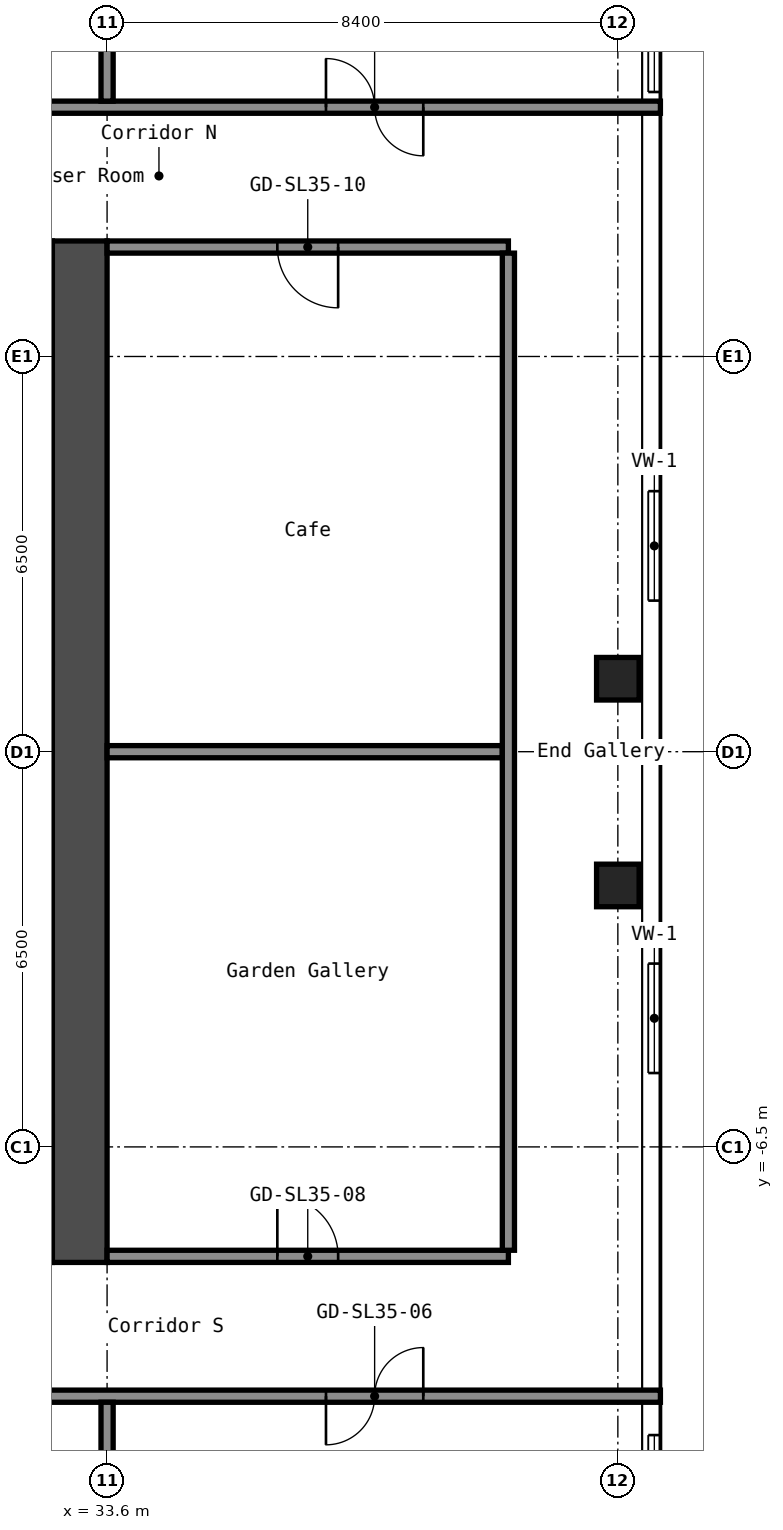
"""IFC4 building model, lengths in metres.
Left out: names, types, materials, properties, quantities, classifications, styles, units other than length and angle.
Written with IfcOpenShell. Run it as: python <this file> out.ifc"""

import sys

from ifc_helpers import new_model, si_unit, direction, frame, frame_2d, origin, origin_2d, place, context, subcontext, project, spatial, rectangle, hollow_rectangle, extrude, element, fill, save


model = new_model("IFC4")
c1 = context("Model", 3, precision=1e-05, world=origin(), true_north=direction((0.0, 1.0)))
c2 = subcontext(c1, "Body", "Model", "MODEL_VIEW")
j1 = project(units=[si_unit("LENGTHUNIT", "METRE"), si_unit("PLANEANGLEUNIT", "RADIAN")], contexts=[c1])
p1 = place(None, origin())
s1 = spatial("IfcSite", under=j1, at=p1, CompositionType="ELEMENT")
p2 = place(p1, origin())
s2 = spatial("IfcBuilding", under=s1, at=p2, CompositionType="ELEMENT")
p3 = place(p2, frame((0.0, 0.0, 124.6)))
s3 = spatial("IfcBuildingStorey", under=s2, at=p3, CompositionType="ELEMENT", Elevation=124.6)
for number, where, z_axis, x_axis in (
    (1, (42.0, -2.2, 0.0), (0.0, 0.0, 1.0), (1.0, 0.0, 0.0)),
    (2, (42.0, 1.2, 0.0), (0.0, 0.0, 1.0), (1.0, 0.0, 0.0)),
):
    element("IfcColumn", number, at=place(p3, frame(where, z_axis=z_axis, x_axis=x_axis)), inside=s3, PredefinedType="COLUMN", context=c2, shape_type="SweptSolid", body=[
        extrude(hollow_rectangle(XDim=0.7, YDim=0.7, WallThickness=0.028, at=origin_2d()), origin(), (0.0, 0.0, 1.0), 5.95),
    ])
p4 = place(p3, frame((33.15, -8.4, 0.0), z_axis=(0.0, 0.0, 1.0), x_axis=(0.0, 1.0, 0.0)))
e3 = element("IfcWall", 3, at=p4, inside=s3, PredefinedType="SHEAR", context=c2, shape_type="SweptSolid", body=[
    extrude(rectangle(XDim=16.8, YDim=0.9, at=frame_2d((8.4, 0.0))), origin(), (0.0, 0.0, 1.0), 5.95),
])
p5 = place(p3, frame((16.8, -10.6, 0.0), z_axis=(0.0, 0.0, 1.0), x_axis=(1.0, 0.0, 0.0)))
e4 = element("IfcWall", 4, at=p5, inside=s3, PredefinedType="PARTITIONING", context=c2, shape_type="SweptSolid", body=[
    extrude(rectangle(XDim=25.9, YDim=0.2, at=frame_2d((12.95, 0.0))), origin(), (0.0, 0.0, 1.0), 5.95),
])
p6 = place(p5, frame((0.8, 0.0, 0.0)))
e5 = element("IfcOpeningElement", 5, at=p6, cuts=e4, PredefinedType="OPENING", context=c2, shape_type="SweptSolid", body=[
    extrude(rectangle(XDim=0.9, YDim=2.1, at=frame_2d((0.45, 1.05))), frame((0.0, 0.11, 0.0), z_axis=(0.0, -1.0, 0.0), x_axis=(1.0, 0.0, 0.0)), (0.0, 0.0, 1.0), 0.22),
])
p7 = place(p5, frame((6.51, 0.0, 0.0)))
e6 = element("IfcOpeningElement", 6, at=p7, cuts=e4, PredefinedType="OPENING", context=c2, shape_type="SweptSolid", body=[
    extrude(rectangle(XDim=0.9, YDim=2.1, at=frame_2d((0.45, 1.05))), frame((0.0, 0.11, 0.0), z_axis=(0.0, -1.0, 0.0), x_axis=(1.0, 0.0, 0.0)), (0.0, 0.0, 1.0), 0.22),
])
p8 = place(p5, frame((13.66, 0.0, 0.0)))
e7 = element("IfcOpeningElement", 7, at=p8, cuts=e4, PredefinedType="OPENING", context=c2, shape_type="SweptSolid", body=[
    extrude(rectangle(XDim=0.9, YDim=2.1, at=frame_2d((0.45, 1.05))), frame((0.0, 0.11, 0.0), z_axis=(0.0, -1.0, 0.0), x_axis=(1.0, 0.0, 0.0)), (0.0, 0.0, 1.0), 0.22),
])
p9 = place(p5, frame((20.4, 0.0, 0.0)))
e8 = element("IfcOpeningElement", 8, at=p9, cuts=e4, PredefinedType="OPENING", context=c2, shape_type="SweptSolid", body=[
    extrude(rectangle(XDim=1.6, YDim=2.1, at=frame_2d((0.8, 1.05))), frame((0.0, 0.11, 0.0), z_axis=(0.0, -1.0, 0.0), x_axis=(1.0, 0.0, 0.0)), (0.0, 0.0, 1.0), 0.22),
])
p10 = place(p3, frame((33.6, -8.3, 0.0), z_axis=(0.0, 0.0, 1.0), x_axis=(1.0, 0.0, 0.0)))
e9 = element("IfcWall", 9, at=p10, inside=s3, PredefinedType="PARTITIONING", context=c2, shape_type="SweptSolid", body=[
    extrude(rectangle(XDim=6.6, YDim=0.2, at=frame_2d((3.3, 0.0))), origin(), (0.0, 0.0, 1.0), 5.95),
])
p11 = place(p10, frame((2.8, 0.0, 0.0)))
e10 = element("IfcOpeningElement", 10, at=p11, cuts=e9, PredefinedType="OPENING", context=c2, shape_type="SweptSolid", body=[
    extrude(rectangle(XDim=1.0, YDim=2.1, at=frame_2d((0.5, 1.05))), frame((0.0, 0.11, 0.0), z_axis=(0.0, -1.0, 0.0), x_axis=(1.0, 0.0, 0.0)), (0.0, 0.0, 1.0), 0.22),
])
p12 = place(p3, frame((33.6, 0.0, 0.0), z_axis=(0.0, 0.0, 1.0), x_axis=(1.0, 0.0, 0.0)))
e11 = element("IfcWall", 11, at=p12, inside=s3, PredefinedType="PARTITIONING", context=c2, shape_type="SweptSolid", body=[
    extrude(rectangle(XDim=6.5, YDim=0.2, at=frame_2d((3.25, 0.0))), origin(), (0.0, 0.0, 1.0), 5.95),
])
p13 = place(p3, frame((33.6, 8.3, 0.0), z_axis=(0.0, 0.0, 1.0), x_axis=(1.0, 0.0, 0.0)))
e12 = element("IfcWall", 12, at=p13, inside=s3, PredefinedType="PARTITIONING", context=c2, shape_type="SweptSolid", body=[
    extrude(rectangle(XDim=6.6, YDim=0.2, at=frame_2d((3.3, 0.0))), origin(), (0.0, 0.0, 1.0), 5.95),
])
p14 = place(p13, frame((2.8, 0.0, 0.0)))
e13 = element("IfcOpeningElement", 13, at=p14, cuts=e12, PredefinedType="OPENING", context=c2, shape_type="SweptSolid", body=[
    extrude(rectangle(XDim=1.0, YDim=2.1, at=frame_2d((0.5, 1.05))), frame((0.0, 0.11, 0.0), z_axis=(0.0, -1.0, 0.0), x_axis=(1.0, 0.0, 0.0)), (0.0, 0.0, 1.0), 0.22),
])
p15 = place(p3, frame((16.8, 10.6, 0.0), z_axis=(0.0, 0.0, 1.0), x_axis=(1.0, 0.0, 0.0)))
e14 = element("IfcWall", 14, at=p15, inside=s3, PredefinedType="PARTITIONING", context=c2, shape_type="SweptSolid", body=[
    extrude(rectangle(XDim=25.9, YDim=0.2, at=frame_2d((12.95, 0.0))), origin(), (0.0, 0.0, 1.0), 5.95),
])
p16 = place(p15, frame((4.2, 0.0, 0.0)))
e15 = element("IfcOpeningElement", 15, at=p16, cuts=e14, PredefinedType="OPENING", context=c2, shape_type="SweptSolid", body=[
    extrude(rectangle(XDim=1.6, YDim=2.1, at=frame_2d((0.8, 1.05))), frame((0.0, 0.11, 0.0), z_axis=(0.0, -1.0, 0.0), x_axis=(1.0, 0.0, 0.0)), (0.0, 0.0, 1.0), 0.22),
])
p17 = place(p15, frame((20.4, 0.0, 0.0)))
e16 = element("IfcOpeningElement", 16, at=p17, cuts=e14, PredefinedType="OPENING", context=c2, shape_type="SweptSolid", body=[
    extrude(rectangle(XDim=1.6, YDim=2.1, at=frame_2d((0.8, 1.05))), frame((0.0, 0.11, 0.0), z_axis=(0.0, -1.0, 0.0), x_axis=(1.0, 0.0, 0.0)), (0.0, 0.0, 1.0), 0.22),
])
p18 = place(p3, frame((33.6, -19.3, 0.0), z_axis=(0.0, 0.0, 1.0), x_axis=(0.0, 1.0, 0.0)))
e17 = element("IfcWall", 17, at=p18, inside=s3, PredefinedType="PARTITIONING", context=c2, shape_type="SweptSolid", body=[
    extrude(rectangle(XDim=8.6, YDim=0.2, at=frame_2d((4.3, 0.0))), origin(), (0.0, 0.0, 1.0), 5.95),
])
p19 = place(p3, frame((33.6, 10.7, 0.0), z_axis=(0.0, 0.0, 1.0), x_axis=(0.0, 1.0, 0.0)))
e18 = element("IfcWall", 18, at=p19, inside=s3, PredefinedType="PARTITIONING", context=c2, shape_type="SweptSolid", body=[
    extrude(rectangle(XDim=7.6, YDim=0.2, at=frame_2d((3.8, 0.0))), origin(), (0.0, 0.0, 1.0), 5.95),
])
p20 = place(p3, frame((40.2, -8.2, 0.0), z_axis=(0.0, 0.0, 1.0), x_axis=(0.0, 1.0, 0.0)))
e19 = element("IfcWall", 19, at=p20, inside=s3, PredefinedType="PARTITIONING", context=c2, shape_type="SweptSolid", body=[
    extrude(rectangle(XDim=16.4, YDim=0.2, at=frame_2d((8.2, 0.0))), origin(), (0.0, 0.0, 1.0), 5.95),
])
p21 = place(p3, frame((42.6, -16.01, 4.45), z_axis=(0.0, 0.0, 1.0), x_axis=(0.0, 1.0, 0.0)))
p22 = place(p21, frame((2.97, 0.0, 0.25)))
p23 = place(p22, origin())
e20 = element("IfcWindow", 20, at=p23, inside=s3, PartitioningType="SINGLE_PANEL", PredefinedType="WINDOW", context=c2, shape_type="SweptSolid", body=[
    extrude(rectangle(XDim=1.8, YDim=0.9, at=frame_2d((0.9, 0.45))), frame((0.0, 0.03, 0.0), z_axis=(0.0, -1.0, 0.0), x_axis=(1.0, 0.0, 0.0)), (0.0, 0.0, 1.0), 0.06),
])
p24 = place(p3, frame((42.6, -8.27, 4.45), z_axis=(0.0, 0.0, 1.0), x_axis=(0.0, 1.0, 0.0)))
p25 = place(p24, frame((2.985, 0.0, 0.25)))
p26 = place(p25, origin())
e21 = element("IfcWindow", 21, at=p26, inside=s3, PartitioningType="SINGLE_PANEL", PredefinedType="WINDOW", context=c2, shape_type="SweptSolid", body=[
    extrude(rectangle(XDim=1.8, YDim=0.9, at=frame_2d((0.9, 0.45))), frame((0.0, 0.03, 0.0), z_axis=(0.0, -1.0, 0.0), x_axis=(1.0, 0.0, 0.0)), (0.0, 0.0, 1.0), 0.06),
])
p27 = place(p3, frame((42.6, -0.5, 4.45), z_axis=(0.0, 0.0, 1.0), x_axis=(0.0, 1.0, 0.0)))
p28 = place(p27, frame((2.985, 0.0, 0.25)))
p29 = place(p28, origin())
e22 = element("IfcWindow", 22, at=p29, inside=s3, PartitioningType="SINGLE_PANEL", PredefinedType="WINDOW", context=c2, shape_type="SweptSolid", body=[
    extrude(rectangle(XDim=1.8, YDim=0.9, at=frame_2d((0.9, 0.45))), frame((0.0, 0.03, 0.0), z_axis=(0.0, -1.0, 0.0), x_axis=(1.0, 0.0, 0.0)), (0.0, 0.0, 1.0), 0.06),
])
p30 = place(p3, frame((42.6, 7.27, 4.45), z_axis=(0.0, 0.0, 1.0), x_axis=(0.0, 1.0, 0.0)))
p31 = place(p30, frame((3.58, 0.0, 0.25)))
p32 = place(p31, origin())
e23 = element("IfcWindow", 23, at=p32, inside=s3, PartitioningType="SINGLE_PANEL", PredefinedType="WINDOW", context=c2, shape_type="SweptSolid", body=[
    extrude(rectangle(XDim=1.8, YDim=0.9, at=frame_2d((0.9, 0.45))), frame((0.0, 0.03, 0.0), z_axis=(0.0, -1.0, 0.0), x_axis=(1.0, 0.0, 0.0)), (0.0, 0.0, 1.0), 0.06),
])
p33 = place(p9, origin())
e24 = element("IfcDoor", 24, at=p33, inside=s3, OperationType="DOUBLE_DOOR_SINGLE_SWING", PredefinedType="DOOR", context=c2, shape_type="SweptSolid", body=[
    extrude(rectangle(XDim=1.6, YDim=2.1, at=frame_2d((0.8, 1.05))), frame((0.0, 0.025, 0.0), z_axis=(0.0, -1.0, 0.0), x_axis=(1.0, 0.0, 0.0)), (0.0, 0.0, 1.0), 0.05),
])
fill(e8, e24)
p34 = place(p11, origin())
e25 = element("IfcDoor", 25, at=p34, inside=s3, OperationType="SINGLE_SWING_RIGHT", PredefinedType="DOOR", context=c2, shape_type="SweptSolid", body=[
    extrude(rectangle(XDim=1.0, YDim=2.1, at=frame_2d((0.5, 1.05))), frame((0.0, 0.025, 0.0), z_axis=(0.0, -1.0, 0.0), x_axis=(1.0, 0.0, 0.0)), (0.0, 0.0, 1.0), 0.05),
])
fill(e10, e25)
p35 = place(p14, origin())
e26 = element("IfcDoor", 26, at=p35, inside=s3, OperationType="SINGLE_SWING_RIGHT", PredefinedType="DOOR", context=c2, shape_type="SweptSolid", body=[
    extrude(rectangle(XDim=1.0, YDim=2.1, at=frame_2d((0.5, 1.05))), frame((0.0, 0.025, 0.0), z_axis=(0.0, -1.0, 0.0), x_axis=(1.0, 0.0, 0.0)), (0.0, 0.0, 1.0), 0.05),
])
fill(e13, e26)
p36 = place(p17, origin())
e27 = element("IfcDoor", 27, at=p36, inside=s3, OperationType="DOUBLE_DOOR_SINGLE_SWING", PredefinedType="DOOR", context=c2, shape_type="SweptSolid", body=[
    extrude(rectangle(XDim=1.6, YDim=2.1, at=frame_2d((0.8, 1.05))), frame((0.0, 0.025, 0.0), z_axis=(0.0, -1.0, 0.0), x_axis=(1.0, 0.0, 0.0)), (0.0, 0.0, 1.0), 0.05),
])
fill(e16, e27)
save(model, sys.argv[1])
